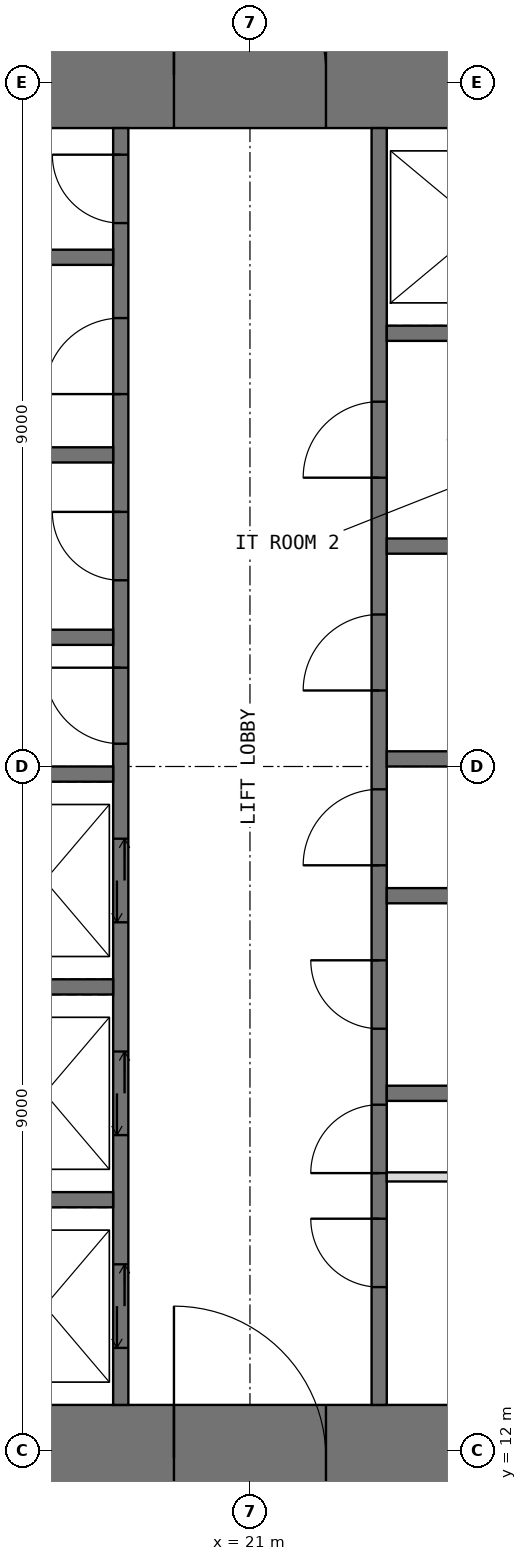
"""IFC4 building model, lengths in metres.
Left out: names, types, materials, properties, quantities, classifications, styles, units other than length and angle.
Written with IfcOpenShell. Run it as: python <this file> out.ifc"""

import sys

from ifc_helpers import new_model, si_unit, direction, frame, frame_2d, origin, place, context, subcontext, project, spatial, rectangle, extrude, element, fill, save


model = new_model("IFC4")
c1 = context("Model", 3, precision=1e-05, world=origin(), true_north=direction((0.0, 1.0)))
c2 = subcontext(c1, "Body", "Model", "MODEL_VIEW")
j1 = project(units=[si_unit("LENGTHUNIT", "METRE"), si_unit("PLANEANGLEUNIT", "RADIAN")], contexts=[c1])
p1 = place(None, origin())
s1 = spatial("IfcSite", under=j1, at=p1, CompositionType="ELEMENT")
p2 = place(p1, origin())
s2 = spatial("IfcBuilding", under=s1, at=p2, CompositionType="ELEMENT")
p3 = place(p2, frame((0.0, 0.0, 230.5)))
s3 = spatial("IfcBuildingStorey", under=s2, at=p3, CompositionType="ELEMENT", Elevation=230.5)
p4 = place(p3, frame((11.2, 11.9, -0.05), z_axis=(0.0, 0.0, 1.0), x_axis=(1.0, 0.0, 0.0)))
e1 = element("IfcWall", 1, at=p4, inside=s3, PredefinedType="SHEAR", context=c2, shape_type="SweptSolid", body=[
    extrude(rectangle(XDim=19.6, YDim=1.4, at=frame_2d((9.8, 0.0))), origin(), (0.0, 0.0, 1.0), 3.8),
])
p5 = place(p4, frame((8.8, 0.0, 0.05)))
e2 = element("IfcOpeningElement", 2, at=p5, cuts=e1, PredefinedType="OPENING", context=c2, shape_type="SweptSolid", body=[
    extrude(rectangle(XDim=2.0, YDim=2.2, at=frame_2d((1.0, 1.1))), frame((0.0, 0.71, 0.0), z_axis=(0.0, -1.0, 0.0), x_axis=(1.0, 0.0, 0.0)), (0.0, 0.0, 1.0), 1.42),
])
p6 = place(p3, frame((11.2, 30.1, -0.05), z_axis=(0.0, 0.0, 1.0), x_axis=(1.0, 0.0, 0.0)))
e3 = element("IfcWall", 3, at=p6, inside=s3, PredefinedType="SHEAR", context=c2, shape_type="SweptSolid", body=[
    extrude(rectangle(XDim=19.6, YDim=1.4, at=frame_2d((9.8, 0.0))), origin(), (0.0, 0.0, 1.0), 3.8),
])
p7 = place(p6, frame((8.8, 0.0, 0.05)))
e4 = element("IfcOpeningElement", 4, at=p7, cuts=e3, PredefinedType="OPENING", context=c2, shape_type="SweptSolid", body=[
    extrude(rectangle(XDim=2.0, YDim=2.2, at=frame_2d((1.0, 1.1))), frame((0.0, 0.71, 0.0), z_axis=(0.0, -1.0, 0.0), x_axis=(1.0, 0.0, 0.0)), (0.0, 0.0, 1.0), 1.42),
])
p8 = place(p3, frame((19.3, 12.6, -0.05), z_axis=(0.0, 0.0, 1.0), x_axis=(0.0, 1.0, 0.0)))
e5 = element("IfcWall", 5, at=p8, inside=s3, PredefinedType="SHEAR", context=c2, shape_type="SweptSolid", body=[
    extrude(rectangle(XDim=16.8, YDim=0.2, at=frame_2d((8.4, 0.0))), origin(), (0.0, 0.0, 1.0), 3.8),
])
p9 = place(p8, frame((8.7, 0.0, 0.05)))
e6 = element("IfcOpeningElement", 6, at=p9, cuts=e5, PredefinedType="OPENING", context=c2, shape_type="SweptSolid", body=[
    extrude(rectangle(XDim=1.0, YDim=2.2, at=frame_2d((0.5, 1.1))), frame((0.0, 0.11, 0.0), z_axis=(0.0, -1.0, 0.0), x_axis=(1.0, 0.0, 0.0)), (0.0, 0.0, 1.0), 0.22),
])
p10 = place(p8, frame((10.85, 0.0, 0.05)))
e7 = element("IfcOpeningElement", 7, at=p10, cuts=e5, PredefinedType="OPENING", context=c2, shape_type="SweptSolid", body=[
    extrude(rectangle(XDim=0.9, YDim=2.2, at=frame_2d((0.45, 1.1))), frame((0.0, 0.11, 0.0), z_axis=(0.0, -1.0, 0.0), x_axis=(1.0, 0.0, 0.0)), (0.0, 0.0, 1.0), 0.22),
])
p11 = place(p8, frame((13.3, 0.0, 0.05)))
e8 = element("IfcOpeningElement", 8, at=p11, cuts=e5, PredefinedType="OPENING", context=c2, shape_type="SweptSolid", body=[
    extrude(rectangle(XDim=1.0, YDim=2.2, at=frame_2d((0.5, 1.1))), frame((0.0, 0.11, 0.0), z_axis=(0.0, -1.0, 0.0), x_axis=(1.0, 0.0, 0.0)), (0.0, 0.0, 1.0), 0.22),
])
p12 = place(p8, frame((15.55, 0.0, 0.05)))
e9 = element("IfcOpeningElement", 9, at=p12, cuts=e5, PredefinedType="OPENING", context=c2, shape_type="SweptSolid", body=[
    extrude(rectangle(XDim=0.9, YDim=2.2, at=frame_2d((0.45, 1.1))), frame((0.0, 0.11, 0.0), z_axis=(0.0, -1.0, 0.0), x_axis=(1.0, 0.0, 0.0)), (0.0, 0.0, 1.0), 0.22),
])
p13 = place(p8, frame((0.75, 0.0, 0.05)))
e10 = element("IfcOpeningElement", 10, at=p13, cuts=e5, PredefinedType="OPENING", context=c2, shape_type="SweptSolid", body=[
    extrude(rectangle(XDim=1.1, YDim=2.2, at=frame_2d((0.55, 1.1))), frame((0.0, 0.11, 0.0), z_axis=(0.0, -1.0, 0.0), x_axis=(1.0, 0.0, 0.0)), (0.0, 0.0, 1.0), 0.22),
])
p14 = place(p8, frame((3.55, 0.0, 0.05)))
e11 = element("IfcOpeningElement", 11, at=p14, cuts=e5, PredefinedType="OPENING", context=c2, shape_type="SweptSolid", body=[
    extrude(rectangle(XDim=1.1, YDim=2.2, at=frame_2d((0.55, 1.1))), frame((0.0, 0.11, 0.0), z_axis=(0.0, -1.0, 0.0), x_axis=(1.0, 0.0, 0.0)), (0.0, 0.0, 1.0), 0.22),
])
p15 = place(p8, frame((6.35, 0.0, 0.05)))
e12 = element("IfcOpeningElement", 12, at=p15, cuts=e5, PredefinedType="OPENING", context=c2, shape_type="SweptSolid", body=[
    extrude(rectangle(XDim=1.1, YDim=2.2, at=frame_2d((0.55, 1.1))), frame((0.0, 0.11, 0.0), z_axis=(0.0, -1.0, 0.0), x_axis=(1.0, 0.0, 0.0)), (0.0, 0.0, 1.0), 0.22),
])
p16 = place(p3, frame((22.7, 12.6, -0.05), z_axis=(0.0, 0.0, 1.0), x_axis=(0.0, 1.0, 0.0)))
e13 = element("IfcWall", 13, at=p16, inside=s3, PredefinedType="SHEAR", context=c2, shape_type="SweptSolid", body=[
    extrude(rectangle(XDim=16.8, YDim=0.2, at=frame_2d((8.4, 0.0))), origin(), (0.0, 0.0, 1.0), 3.8),
])
p17 = place(p16, frame((3.05, 0.0, 0.05)))
e14 = element("IfcOpeningElement", 14, at=p17, cuts=e13, PredefinedType="OPENING", context=c2, shape_type="SweptSolid", body=[
    extrude(rectangle(XDim=0.9, YDim=2.2, at=frame_2d((0.45, 1.1))), frame((0.0, 0.11, 0.0), z_axis=(0.0, -1.0, 0.0), x_axis=(1.0, 0.0, 0.0)), (0.0, 0.0, 1.0), 0.22),
])
p18 = place(p16, frame((7.1, 0.0, 0.05)))
e15 = element("IfcOpeningElement", 15, at=p18, cuts=e13, PredefinedType="OPENING", context=c2, shape_type="SweptSolid", body=[
    extrude(rectangle(XDim=1.0, YDim=2.2, at=frame_2d((0.5, 1.1))), frame((0.0, 0.11, 0.0), z_axis=(0.0, -1.0, 0.0), x_axis=(1.0, 0.0, 0.0)), (0.0, 0.0, 1.0), 0.22),
])
p19 = place(p16, frame((1.55, 0.0, 0.05)))
e16 = element("IfcOpeningElement", 16, at=p19, cuts=e13, PredefinedType="OPENING", context=c2, shape_type="SweptSolid", body=[
    extrude(rectangle(XDim=0.9, YDim=2.2, at=frame_2d((0.45, 1.1))), frame((0.0, 0.11, 0.0), z_axis=(0.0, -1.0, 0.0), x_axis=(1.0, 0.0, 0.0)), (0.0, 0.0, 1.0), 0.22),
])
p20 = place(p16, frame((4.95, 0.0, 0.05)))
e17 = element("IfcOpeningElement", 17, at=p20, cuts=e13, PredefinedType="OPENING", context=c2, shape_type="SweptSolid", body=[
    extrude(rectangle(XDim=0.9, YDim=2.2, at=frame_2d((0.45, 1.1))), frame((0.0, 0.11, 0.0), z_axis=(0.0, -1.0, 0.0), x_axis=(1.0, 0.0, 0.0)), (0.0, 0.0, 1.0), 0.22),
])
p21 = place(p16, frame((9.4, 0.0, 0.05)))
e18 = element("IfcOpeningElement", 18, at=p21, cuts=e13, PredefinedType="OPENING", context=c2, shape_type="SweptSolid", body=[
    extrude(rectangle(XDim=1.0, YDim=2.2, at=frame_2d((0.5, 1.1))), frame((0.0, 0.11, 0.0), z_axis=(0.0, -1.0, 0.0), x_axis=(1.0, 0.0, 0.0)), (0.0, 0.0, 1.0), 0.22),
])
p22 = place(p16, frame((12.2, 0.0, 0.05)))
e19 = element("IfcOpeningElement", 19, at=p22, cuts=e13, PredefinedType="OPENING", context=c2, shape_type="SweptSolid", body=[
    extrude(rectangle(XDim=1.0, YDim=2.2, at=frame_2d((0.5, 1.1))), frame((0.0, 0.11, 0.0), z_axis=(0.0, -1.0, 0.0), x_axis=(1.0, 0.0, 0.0)), (0.0, 0.0, 1.0), 0.22),
])
for number, where, z_axis, x_axis in (
    (20, (16.0, 15.3, -0.05), (0.0, 0.0, 1.0), (1.0, 0.0, 0.0)),
    (21, (16.0, 18.1, -0.05), (0.0, 0.0, 1.0), (1.0, 0.0, 0.0)),
    (22, (16.0, 20.9, -0.05), (0.0, 0.0, 1.0), (1.0, 0.0, 0.0)),
    (23, (16.0, 22.7, -0.05), (0.0, 0.0, 1.0), (1.0, 0.0, 0.0)),
    (24, (16.0, 25.1, -0.05), (0.0, 0.0, 1.0), (1.0, 0.0, 0.0)),
    (25, (16.0, 27.7, -0.05), (0.0, 0.0, 1.0), (1.0, 0.0, 0.0)),
    (26, (22.8, 16.7, -0.05), (0.0, 0.0, 1.0), (1.0, 0.0, 0.0)),
    (27, (22.8, 19.3, -0.05), (0.0, 0.0, 1.0), (1.0, 0.0, 0.0)),
    (28, (22.8, 21.1, -0.05), (0.0, 0.0, 1.0), (1.0, 0.0, 0.0)),
    (29, (22.8, 23.9, -0.05), (0.0, 0.0, 1.0), (1.0, 0.0, 0.0)),
    (30, (22.8, 26.7, -0.05), (0.0, 0.0, 1.0), (1.0, 0.0, 0.0)),
):
    element("IfcWall", number, at=place(p3, frame(where, z_axis=z_axis, x_axis=x_axis)), inside=s3, PredefinedType="SHEAR", context=c2, shape_type="SweptSolid", body=[
        extrude(rectangle(XDim=3.2, YDim=0.2, at=frame_2d((1.6, 0.0))), origin(), (0.0, 0.0, 1.0), 3.8),
    ])
p23 = place(p3, frame((22.8, 15.6, 0.0), z_axis=(0.0, 0.0, 1.0), x_axis=(1.0, 0.0, 0.0)))
e31 = element("IfcWall", 31, at=p23, inside=s3, PredefinedType="PARTITIONING", context=c2, shape_type="SweptSolid", body=[
    extrude(rectangle(XDim=3.2, YDim=0.12, at=frame_2d((1.6, 0.0))), origin(), (0.0, 0.0, 1.0), 3.55),
])
p24 = place(p5, origin())
e32 = element("IfcDoor", 32, at=p24, inside=s3, OperationType="DOUBLE_DOOR_SINGLE_SWING", PredefinedType="DOOR", context=c2, shape_type="SweptSolid", body=[
    extrude(rectangle(XDim=2.0, YDim=2.2, at=frame_2d((1.0, 1.1))), frame((0.0, 0.025, 0.0), z_axis=(0.0, -1.0, 0.0), x_axis=(1.0, 0.0, 0.0)), (0.0, 0.0, 1.0), 0.05),
])
fill(e2, e32)
p25 = place(p7, origin())
e33 = element("IfcDoor", 33, at=p25, inside=s3, OperationType="DOUBLE_DOOR_SINGLE_SWING", PredefinedType="DOOR", context=c2, shape_type="SweptSolid", body=[
    extrude(rectangle(XDim=2.0, YDim=2.2, at=frame_2d((1.0, 1.1))), frame((0.0, 0.025, 0.0), z_axis=(0.0, -1.0, 0.0), x_axis=(1.0, 0.0, 0.0)), (0.0, 0.0, 1.0), 0.05),
])
fill(e4, e33)
p26 = place(p17, origin())
e34 = element("IfcDoor", 34, at=p26, inside=s3, OperationType="SINGLE_SWING_LEFT", PredefinedType="DOOR", context=c2, shape_type="SweptSolid", body=[
    extrude(rectangle(XDim=0.9, YDim=2.2, at=frame_2d((0.45, 1.1))), frame((0.0, 0.025, 0.0), z_axis=(0.0, -1.0, 0.0), x_axis=(1.0, 0.0, 0.0)), (0.0, 0.0, 1.0), 0.05),
])
fill(e14, e34)
p27 = place(p9, origin())
e35 = element("IfcDoor", 35, at=p27, inside=s3, OperationType="SINGLE_SWING_RIGHT", PredefinedType="DOOR", context=c2, shape_type="SweptSolid", body=[
    extrude(rectangle(XDim=1.0, YDim=2.2, at=frame_2d((0.5, 1.1))), frame((0.0, 0.025, 0.0), z_axis=(0.0, -1.0, 0.0), x_axis=(1.0, 0.0, 0.0)), (0.0, 0.0, 1.0), 0.05),
])
fill(e6, e35)
p28 = place(p18, origin())
e36 = element("IfcDoor", 36, at=p28, inside=s3, OperationType="SINGLE_SWING_LEFT", PredefinedType="DOOR", context=c2, shape_type="SweptSolid", body=[
    extrude(rectangle(XDim=1.0, YDim=2.2, at=frame_2d((0.5, 1.1))), frame((0.0, 0.025, 0.0), z_axis=(0.0, -1.0, 0.0), x_axis=(1.0, 0.0, 0.0)), (0.0, 0.0, 1.0), 0.05),
])
fill(e15, e36)
p29 = place(p10, origin())
e37 = element("IfcDoor", 37, at=p29, inside=s3, OperationType="SINGLE_SWING_RIGHT", PredefinedType="DOOR", context=c2, shape_type="SweptSolid", body=[
    extrude(rectangle(XDim=0.9, YDim=2.2, at=frame_2d((0.45, 1.1))), frame((0.0, 0.025, 0.0), z_axis=(0.0, -1.0, 0.0), x_axis=(1.0, 0.0, 0.0)), (0.0, 0.0, 1.0), 0.05),
])
fill(e7, e37)
p30 = place(p11, origin())
e38 = element("IfcDoor", 38, at=p30, inside=s3, OperationType="SINGLE_SWING_LEFT", PredefinedType="DOOR", context=c2, shape_type="SweptSolid", body=[
    extrude(rectangle(XDim=1.0, YDim=2.2, at=frame_2d((0.5, 1.1))), frame((0.0, 0.025, 0.0), z_axis=(0.0, -1.0, 0.0), x_axis=(1.0, 0.0, 0.0)), (0.0, 0.0, 1.0), 0.05),
])
fill(e8, e38)
p31 = place(p12, origin())
e39 = element("IfcDoor", 39, at=p31, inside=s3, OperationType="SINGLE_SWING_RIGHT", PredefinedType="DOOR", context=c2, shape_type="SweptSolid", body=[
    extrude(rectangle(XDim=0.9, YDim=2.2, at=frame_2d((0.45, 1.1))), frame((0.0, 0.025, 0.0), z_axis=(0.0, -1.0, 0.0), x_axis=(1.0, 0.0, 0.0)), (0.0, 0.0, 1.0), 0.05),
])
fill(e9, e39)
p32 = place(p19, origin())
e40 = element("IfcDoor", 40, at=p32, inside=s3, OperationType="SINGLE_SWING_RIGHT", PredefinedType="DOOR", context=c2, shape_type="SweptSolid", body=[
    extrude(rectangle(XDim=0.9, YDim=2.2, at=frame_2d((0.45, 1.1))), frame((0.0, 0.025, 0.0), z_axis=(0.0, -1.0, 0.0), x_axis=(1.0, 0.0, 0.0)), (0.0, 0.0, 1.0), 0.05),
])
fill(e16, e40)
p33 = place(p20, origin())
e41 = element("IfcDoor", 41, at=p33, inside=s3, OperationType="SINGLE_SWING_RIGHT", PredefinedType="DOOR", context=c2, shape_type="SweptSolid", body=[
    extrude(rectangle(XDim=0.9, YDim=2.2, at=frame_2d((0.45, 1.1))), frame((0.0, 0.025, 0.0), z_axis=(0.0, -1.0, 0.0), x_axis=(1.0, 0.0, 0.0)), (0.0, 0.0, 1.0), 0.05),
])
fill(e17, e41)
p34 = place(p21, origin())
e42 = element("IfcDoor", 42, at=p34, inside=s3, OperationType="SINGLE_SWING_LEFT", PredefinedType="DOOR", context=c2, shape_type="SweptSolid", body=[
    extrude(rectangle(XDim=1.0, YDim=2.2, at=frame_2d((0.5, 1.1))), frame((0.0, 0.025, 0.0), z_axis=(0.0, -1.0, 0.0), x_axis=(1.0, 0.0, 0.0)), (0.0, 0.0, 1.0), 0.05),
])
fill(e18, e42)
p35 = place(p22, origin())
e43 = element("IfcDoor", 43, at=p35, inside=s3, OperationType="SINGLE_SWING_LEFT", PredefinedType="DOOR", context=c2, shape_type="SweptSolid", body=[
    extrude(rectangle(XDim=1.0, YDim=2.2, at=frame_2d((0.5, 1.1))), frame((0.0, 0.025, 0.0), z_axis=(0.0, -1.0, 0.0), x_axis=(1.0, 0.0, 0.0)), (0.0, 0.0, 1.0), 0.05),
])
fill(e19, e43)
p36 = place(p13, origin())
e44 = element("IfcDoor", 44, at=p36, inside=s3, OperationType="DOUBLE_DOOR_SLIDING", PredefinedType="DOOR", context=c2, shape_type="SweptSolid", body=[
    extrude(rectangle(XDim=1.1, YDim=2.2, at=frame_2d((0.55, 1.1))), frame((0.0, 0.025, 0.0), z_axis=(0.0, -1.0, 0.0), x_axis=(1.0, 0.0, 0.0)), (0.0, 0.0, 1.0), 0.05),
])
fill(e10, e44)
p37 = place(p14, origin())
e45 = element("IfcDoor", 45, at=p37, inside=s3, OperationType="DOUBLE_DOOR_SLIDING", PredefinedType="DOOR", context=c2, shape_type="SweptSolid", body=[
    extrude(rectangle(XDim=1.1, YDim=2.2, at=frame_2d((0.55, 1.1))), frame((0.0, 0.025, 0.0), z_axis=(0.0, -1.0, 0.0), x_axis=(1.0, 0.0, 0.0)), (0.0, 0.0, 1.0), 0.05),
])
fill(e11, e45)
p38 = place(p15, origin())
e46 = element("IfcDoor", 46, at=p38, inside=s3, OperationType="DOUBLE_DOOR_SLIDING", PredefinedType="DOOR", context=c2, shape_type="SweptSolid", body=[
    extrude(rectangle(XDim=1.1, YDim=2.2, at=frame_2d((0.55, 1.1))), frame((0.0, 0.025, 0.0), z_axis=(0.0, -1.0, 0.0), x_axis=(1.0, 0.0, 0.0)), (0.0, 0.0, 1.0), 0.05),
])
fill(e12, e46)
save(model, sys.argv[1])
